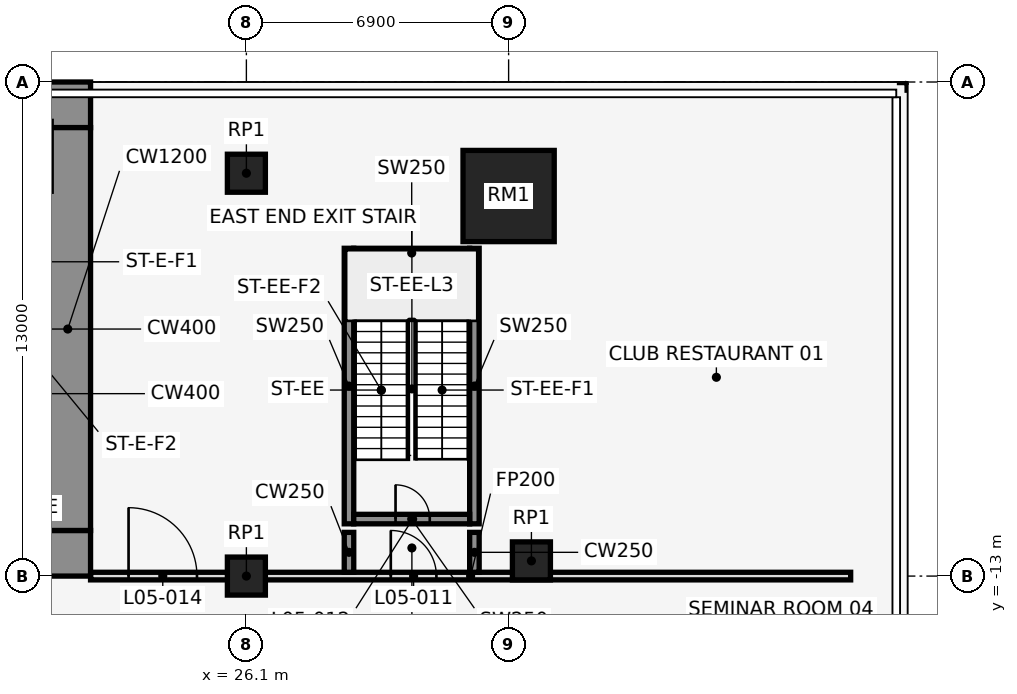
"""IFC4 building model, lengths in metres.
Left out: names, types, materials, properties, quantities, classifications, styles, units other than length and angle.
Written with IfcOpenShell. Run it as: python <this file> out.ifc"""

import sys

from ifc_helpers import new_model, si_unit, direction, frame, frame_2d, origin, origin_2d, place, context, subcontext, project, spatial, rectangle, extrude, element, fill, save


model = new_model("IFC4")
c1 = context("Model", 3, precision=1e-05, world=origin(), true_north=direction((0.0, 1.0)))
c2 = subcontext(c1, "Body", "Model", "MODEL_VIEW")
j1 = project(units=[si_unit("LENGTHUNIT", "METRE"), si_unit("PLANEANGLEUNIT", "RADIAN")], contexts=[c1])
p1 = place(None, origin())
s1 = spatial("IfcSite", under=j1, at=p1, CompositionType="ELEMENT")
p2 = place(p1, origin())
s2 = spatial("IfcBuilding", under=s1, at=p2, CompositionType="ELEMENT")
p3 = place(p2, frame((0.0, 0.0, 30.0)))
s3 = spatial("IfcBuildingStorey", under=s2, at=p3, CompositionType="ELEMENT", Elevation=30.0)
p4 = place(p3, frame((26.1, -2.4, 0.0), z_axis=(0.0, 0.0, 1.0), x_axis=(1.0, 0.0, 0.0)))
e1 = element("IfcColumn", 1, at=p4, inside=s3, PredefinedType="COLUMN", context=c2, shape_type="SweptSolid", body=[
    extrude(rectangle(XDim=1.0, YDim=1.0, at=origin_2d()), origin(), (0.0, 0.0, 1.0), 5.0),
])
p5 = place(p3, frame((33.0, -3.0, 0.0), z_axis=(0.0, 0.0, 1.0), x_axis=(1.0, 0.0, 0.0)))
e2 = element("IfcColumn", 2, at=p5, inside=s3, PredefinedType="COLUMN", context=c2, shape_type="SweptSolid", body=[
    extrude(rectangle(XDim=2.4, YDim=2.4, at=origin_2d()), origin(), (0.0, 0.0, 1.0), 5.0),
])
for number, where, z_axis, x_axis in (
    (3, (33.6, -12.6, 0.0), (0.0, 0.0, 1.0), (1.0, 0.0, 0.0)),
    (4, (26.1, -13.0, 0.0), (0.0, 0.0, 1.0), (1.0, 0.0, 0.0)),
):
    element("IfcColumn", number, at=place(p3, frame(where, z_axis=z_axis, x_axis=x_axis)), inside=s3, PredefinedType="COLUMN", context=c2, shape_type="SweptSolid", body=[
        extrude(rectangle(XDim=1.0, YDim=1.0, at=origin_2d()), origin(), (0.0, 0.0, 1.0), 5.0),
    ])
for number, where, z_axis, x_axis in (
    (5, (28.8, -11.625, 0.0), (0.0, 0.0, 1.0), (0.0, 1.0, 0.0)),
    (6, (32.1, -11.625, 0.0), (0.0, 0.0, 1.0), (0.0, 1.0, 0.0)),
):
    element("IfcWall", number, at=place(p3, frame(where, z_axis=z_axis, x_axis=x_axis)), inside=s3, PredefinedType="SHEAR", context=c2, shape_type="SweptSolid", body=[
        extrude(rectangle(XDim=7.25, YDim=0.25, at=frame_2d((3.625, 0.0))), origin(), (0.0, 0.0, 1.0), 5.0),
    ])
p6 = place(p3, frame((28.925, -11.5, 0.0), z_axis=(0.0, 0.0, 1.0), x_axis=(1.0, 0.0, 0.0)))
e7 = element("IfcWall", 7, at=p6, inside=s3, PredefinedType="SHEAR", context=c2, shape_type="SweptSolid", body=[
    extrude(rectangle(XDim=3.05, YDim=0.25, at=frame_2d((1.525, 0.0))), origin(), (0.0, 0.0, 1.0), 5.0),
])
p7 = place(p6, frame((1.1, 0.0, 0.0)))
e8 = element("IfcOpeningElement", 8, at=p7, cuts=e7, PredefinedType="OPENING", context=c2, shape_type="SweptSolid", body=[
    extrude(rectangle(XDim=0.9, YDim=2.1, at=frame_2d((0.45, 1.05))), frame((0.0, 0.137, 0.0), z_axis=(0.0, -1.0, 0.0), x_axis=(1.0, 0.0, 0.0)), (0.0, 0.0, 1.0), 0.274),
])
p8 = place(p3, frame((28.925, -4.5, 0.0), z_axis=(0.0, 0.0, 1.0), x_axis=(1.0, 0.0, 0.0)))
e9 = element("IfcWall", 9, at=p8, inside=s3, PredefinedType="SHEAR", context=c2, shape_type="SweptSolid", body=[
    extrude(rectangle(XDim=3.05, YDim=0.25, at=frame_2d((1.525, 0.0))), origin(), (0.0, 0.0, 1.0), 5.0),
])
p9 = place(p3, frame((22.0, -13.0, 0.0), z_axis=(0.0, 0.0, 1.0), x_axis=(1.0, 0.0, 0.0)))
e10 = element("IfcWall", 10, at=p9, inside=s3, PredefinedType="PARTITIONING", context=c2, shape_type="SweptSolid", body=[
    extrude(rectangle(XDim=20.0, YDim=0.2, at=frame_2d((10.0, 0.0))), origin(), (0.0, 0.0, 1.0), 3.74),
])
p10 = place(p9, frame((7.9, 0.0, 0.0)))
e11 = element("IfcOpeningElement", 11, at=p10, cuts=e10, PredefinedType="OPENING", context=c2, shape_type="SweptSolid", body=[
    extrude(rectangle(XDim=1.2, YDim=2.1, at=frame_2d((0.6, 1.05))), frame((0.0, 0.112, 0.0), z_axis=(0.0, -1.0, 0.0), x_axis=(1.0, 0.0, 0.0)), (0.0, 0.0, 1.0), 0.224),
])
p11 = place(p9, frame((1.0, 0.0, 0.0)))
e12 = element("IfcOpeningElement", 12, at=p11, cuts=e10, PredefinedType="OPENING", context=c2, shape_type="SweptSolid", body=[
    extrude(rectangle(XDim=1.8, YDim=2.1, at=frame_2d((0.9, 1.05))), frame((0.0, 0.112, 0.0), z_axis=(0.0, -1.0, 0.0), x_axis=(1.0, 0.0, 0.0)), (0.0, 0.0, 1.0), 0.224),
])
for number, where, z_axis, x_axis in (
    (13, (28.8, -12.9, 0.0), (0.0, 0.0, 1.0), (0.0, 1.0, 0.0)),
    (14, (32.1, -12.9, 0.0), (0.0, 0.0, 1.0), (0.0, 1.0, 0.0)),
):
    element("IfcWall", number, at=place(p3, frame(where, z_axis=z_axis, x_axis=x_axis)), inside=s3, PredefinedType="SHEAR", context=c2, shape_type="SweptSolid", body=[
        extrude(rectangle(XDim=1.05, YDim=0.25, at=frame_2d((0.525, 0.0))), origin(), (0.0, 0.0, 1.0), 5.0),
    ])
p12 = place(p3, frame((-22.0, -0.6, 0.0), z_axis=(0.0, 0.0, 1.0), x_axis=(1.0, 0.0, 0.0)))
e15 = element("IfcWall", 15, at=p12, inside=s3, PredefinedType="SHEAR", context=c2, shape_type="SweptSolid", body=[
    extrude(rectangle(XDim=44.0, YDim=1.2, at=frame_2d((22.0, 0.0))), origin(), (0.0, 0.0, 1.0), 5.0),
])
p13 = place(p3, frame((-22.0, -12.4, 0.0), z_axis=(0.0, 0.0, 1.0), x_axis=(1.0, 0.0, 0.0)))
e16 = element("IfcWall", 16, at=p13, inside=s3, PredefinedType="SHEAR", context=c2, shape_type="SweptSolid", body=[
    extrude(rectangle(XDim=44.0, YDim=1.2, at=frame_2d((22.0, 0.0))), origin(), (0.0, 0.0, 1.0), 5.0),
])
p14 = place(p13, frame((2.2, 0.0, 0.0)))
e17 = element("IfcOpeningElement", 17, at=p14, cuts=e16, PredefinedType="OPENING", context=c2, shape_type="SweptSolid", body=[
    extrude(rectangle(XDim=1.2, YDim=2.1, at=frame_2d((0.6, 1.05))), frame((0.0, 0.612, 0.0), z_axis=(0.0, -1.0, 0.0), x_axis=(1.0, 0.0, 0.0)), (0.0, 0.0, 1.0), 1.224),
])
p15 = place(p13, frame((21.4, 0.0, 0.0)))
e18 = element("IfcOpeningElement", 18, at=p15, cuts=e16, PredefinedType="OPENING", context=c2, shape_type="SweptSolid", body=[
    extrude(rectangle(XDim=1.2, YDim=2.1, at=frame_2d((0.6, 1.05))), frame((0.0, 0.612, 0.0), z_axis=(0.0, -1.0, 0.0), x_axis=(1.0, 0.0, 0.0)), (0.0, 0.0, 1.0), 1.224),
])
p16 = place(p13, frame((40.6, 0.0, 0.0)))
e19 = element("IfcOpeningElement", 19, at=p16, cuts=e16, PredefinedType="OPENING", context=c2, shape_type="SweptSolid", body=[
    extrude(rectangle(XDim=1.2, YDim=2.1, at=frame_2d((0.6, 1.05))), frame((0.0, 0.612, 0.0), z_axis=(0.0, -1.0, 0.0), x_axis=(1.0, 0.0, 0.0)), (0.0, 0.0, 1.0), 1.224),
])
p17 = place(p13, frame((16.0, 0.0, 0.0)))
e20 = element("IfcOpeningElement", 20, at=p17, cuts=e16, PredefinedType="OPENING", context=c2, shape_type="SweptSolid", body=[
    extrude(rectangle(XDim=1.8, YDim=2.1, at=frame_2d((0.9, 1.05))), frame((0.0, 0.612, 0.0), z_axis=(0.0, -1.0, 0.0), x_axis=(1.0, 0.0, 0.0)), (0.0, 0.0, 1.0), 1.224),
])
p18 = place(p13, frame((6.3, 0.0, 0.0)))
e21 = element("IfcOpeningElement", 21, at=p18, cuts=e16, PredefinedType="OPENING", context=c2, shape_type="SweptSolid", body=[
    extrude(rectangle(XDim=1.2, YDim=2.1, at=frame_2d((0.6, 1.05))), frame((0.0, 0.612, 0.0), z_axis=(0.0, -1.0, 0.0), x_axis=(1.0, 0.0, 0.0)), (0.0, 0.0, 1.0), 1.224),
])
p19 = place(p13, frame((26.2, 0.0, 0.0)))
e22 = element("IfcOpeningElement", 22, at=p19, cuts=e16, PredefinedType="OPENING", context=c2, shape_type="SweptSolid", body=[
    extrude(rectangle(XDim=1.8, YDim=2.1, at=frame_2d((0.9, 1.05))), frame((0.0, 0.612, 0.0), z_axis=(0.0, -1.0, 0.0), x_axis=(1.0, 0.0, 0.0)), (0.0, 0.0, 1.0), 1.224),
])
p20 = place(p13, frame((36.5, 0.0, 0.0)))
e23 = element("IfcOpeningElement", 23, at=p20, cuts=e16, PredefinedType="OPENING", context=c2, shape_type="SweptSolid", body=[
    extrude(rectangle(XDim=1.2, YDim=2.1, at=frame_2d((0.6, 1.05))), frame((0.0, 0.612, 0.0), z_axis=(0.0, -1.0, 0.0), x_axis=(1.0, 0.0, 0.0)), (0.0, 0.0, 1.0), 1.224),
])
p21 = place(p3, frame((21.4, -11.8, 0.0), z_axis=(0.0, 0.0, 1.0), x_axis=(0.0, 1.0, 0.0)))
e24 = element("IfcWall", 24, at=p21, inside=s3, PredefinedType="SHEAR", context=c2, shape_type="SweptSolid", body=[
    extrude(rectangle(XDim=10.6, YDim=1.2, at=frame_2d((5.3, 0.0))), origin(), (0.0, 0.0, 1.0), 5.0),
])
p22 = place(p10, origin())
e25 = element("IfcDoor", 25, at=p22, inside=s3, OperationType="SINGLE_SWING_LEFT", PredefinedType="DOOR", context=c2, shape_type="SweptSolid", body=[
    extrude(rectangle(XDim=1.2, YDim=2.1, at=frame_2d((0.6, 1.05))), frame((0.0, 0.025, 0.0), z_axis=(0.0, -1.0, 0.0), x_axis=(1.0, 0.0, 0.0)), (0.0, 0.0, 1.0), 0.05),
])
fill(e11, e25)
p23 = place(p7, origin())
e26 = element("IfcDoor", 26, at=p23, inside=s3, OperationType="SINGLE_SWING_RIGHT", PredefinedType="DOOR", context=c2, shape_type="SweptSolid", body=[
    extrude(rectangle(XDim=0.9, YDim=2.1, at=frame_2d((0.45, 1.05))), frame((0.0, 0.025, 0.0), z_axis=(0.0, -1.0, 0.0), x_axis=(1.0, 0.0, 0.0)), (0.0, 0.0, 1.0), 0.05),
])
fill(e8, e26)
p24 = place(p11, origin())
e27 = element("IfcDoor", 27, at=p24, inside=s3, OperationType="SINGLE_SWING_LEFT", PredefinedType="DOOR", context=c2, shape_type="SweptSolid", body=[
    extrude(rectangle(XDim=1.8, YDim=2.1, at=frame_2d((0.9, 1.05))), frame((0.0, 0.025, 0.0), z_axis=(0.0, -1.0, 0.0), x_axis=(1.0, 0.0, 0.0)), (0.0, 0.0, 1.0), 0.05),
])
fill(e12, e27)
save(model, sys.argv[1])
